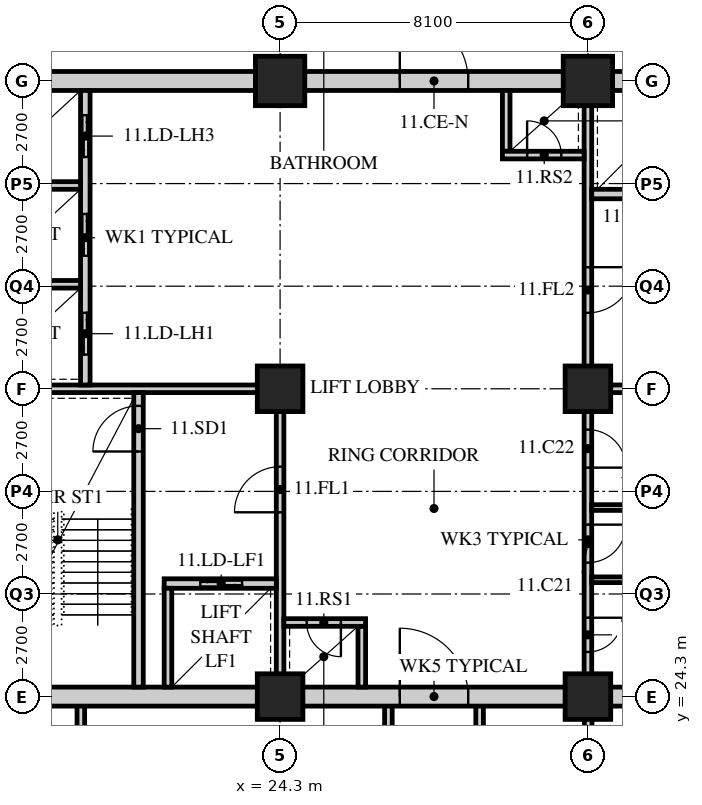
"""IFC4 building model, lengths in metres.
Left out: names, types, materials, properties, quantities, classifications, styles, units other than length and angle.
Written with IfcOpenShell. Run it as: python <this file> out.ifc"""

import sys

from ifc_helpers import new_model, si_unit, direction, frame, frame_2d, origin, origin_2d, place, context, subcontext, project, spatial, rectangle, hollow_rectangle, extrude, element, fill, save


model = new_model("IFC4")
c1 = context("Model", 3, precision=1e-05, world=origin(), true_north=direction((0.0, 1.0)))
c2 = subcontext(c1, "Body", "Model", "MODEL_VIEW")
j1 = project(units=[si_unit("LENGTHUNIT", "METRE"), si_unit("PLANEANGLEUNIT", "RADIAN")], contexts=[c1])
p1 = place(None, origin())
s1 = spatial("IfcSite", under=j1, at=p1, CompositionType="ELEMENT")
p2 = place(p1, origin())
s2 = spatial("IfcBuilding", under=s1, at=p2, CompositionType="ELEMENT")
p3 = place(p2, frame((0.0, 0.0, 50.0)))
s3 = spatial("IfcBuildingStorey", under=s2, at=p3, CompositionType="ELEMENT", Elevation=50.0)
for number, where, z_axis, x_axis in (
    (1, (24.3, 24.3, 0.0), (0.0, 0.0, 1.0), (1.0, 0.0, 0.0)),
    (2, (24.3, 32.4, 0.0), (0.0, 0.0, 1.0), (1.0, 0.0, 0.0)),
):
    element("IfcColumn", number, at=place(p3, frame(where, z_axis=z_axis, x_axis=x_axis)), inside=s3, PredefinedType="COLUMN", context=c2, shape_type="SweptSolid", body=[
        extrude(hollow_rectangle(XDim=1.2, YDim=1.2, WallThickness=0.12, at=origin_2d()), origin(), (0.0, 0.0, 1.0), 3.4),
    ])
p4 = place(p3, frame((24.3, 40.5, 0.0), z_axis=(0.0, 0.0, 1.0), x_axis=(1.0, 0.0, 0.0)))
e3 = element("IfcColumn", 3, at=p4, inside=s3, PredefinedType="COLUMN", context=c2, shape_type="SweptSolid", body=[
    extrude(hollow_rectangle(XDim=1.3, YDim=1.3, WallThickness=0.13, at=origin_2d()), origin(), (0.0, 0.0, 1.0), 3.4),
])
for number, where, z_axis, x_axis in (
    (4, (32.4, 24.3, 0.0), (0.0, 0.0, 1.0), (1.0, 0.0, 0.0)),
    (5, (32.4, 32.4, 0.0), (0.0, 0.0, 1.0), (1.0, 0.0, 0.0)),
):
    element("IfcColumn", number, at=place(p3, frame(where, z_axis=z_axis, x_axis=x_axis)), inside=s3, PredefinedType="COLUMN", context=c2, shape_type="SweptSolid", body=[
        extrude(hollow_rectangle(XDim=1.2, YDim=1.2, WallThickness=0.12, at=origin_2d()), origin(), (0.0, 0.0, 1.0), 3.4),
    ])
p5 = place(p3, frame((32.4, 40.5, 0.0), z_axis=(0.0, 0.0, 1.0), x_axis=(1.0, 0.0, 0.0)))
e6 = element("IfcColumn", 6, at=p5, inside=s3, PredefinedType="COLUMN", context=c2, shape_type="SweptSolid", body=[
    extrude(hollow_rectangle(XDim=1.3, YDim=1.3, WallThickness=0.13, at=origin_2d()), origin(), (0.0, 0.0, 1.0), 3.4),
])
p6 = place(p3, frame((19.057, 18.0, 0.0), z_axis=(0.0, 0.0, 1.0), x_axis=(0.0, 1.0, 0.0)))
e7 = element("IfcWall", 7, at=p6, inside=s3, PredefinedType="SOLIDWALL", context=c2, shape_type="SweptSolid", body=[
    extrude(rectangle(XDim=6.3, YDim=0.2, at=frame_2d((3.15, 0.0))), origin(), (0.0, 0.0, 1.0), 3.19),
])
p7 = place(p3, frame((32.407, 18.0, 0.0), z_axis=(0.0, 0.0, 1.0), x_axis=(0.0, 1.0, 0.0)))
e8 = element("IfcWall", 8, at=p7, inside=s3, PredefinedType="SOLIDWALL", context=c2, shape_type="SweptSolid", body=[
    extrude(rectangle(XDim=6.3, YDim=0.2, at=frame_2d((3.15, 0.0))), origin(), (0.0, 0.0, 1.0), 2.578),
])
for number, where, z_axis, x_axis in (
    (9, (27.15, 18.0, 0.0), (0.0, 0.0, 1.0), (0.0, 1.0, 0.0)),
    (10, (29.55, 18.0, 0.0), (0.0, 0.0, 1.0), (0.0, 1.0, 0.0)),
):
    element("IfcWall", number, at=place(p3, frame(where, z_axis=z_axis, x_axis=x_axis)), inside=s3, PredefinedType="SOLIDWALL", context=c2, shape_type="SweptSolid", body=[
        extrude(rectangle(XDim=6.3, YDim=0.2, at=frame_2d((3.15, 0.0))), origin(), (0.0, 0.0, 1.0), 3.19),
    ])
p8 = place(p3, frame((15.95, 24.3, 0.0), z_axis=(0.0, 0.0, 1.0), x_axis=(1.0, 0.0, 0.0)))
e11 = element("IfcWall", 11, at=p8, inside=s3, PredefinedType="SOLIDWALL", context=c2, shape_type="SweptSolid", body=[
    extrude(rectangle(XDim=24.8, YDim=0.5, at=frame_2d((12.4, 0.0))), origin(), (0.0, 0.0, 1.0), 2.54),
])
p9 = place(p8, frame((11.5, 0.0, 0.0)))
e12 = element("IfcOpeningElement", 12, at=p9, cuts=e11, PredefinedType="OPENING", context=c2, shape_type="SweptSolid", body=[
    extrude(rectangle(XDim=1.8, YDim=2.4, at=frame_2d((0.9, 1.2))), frame((0.0, 0.26, 0.0), z_axis=(0.0, -1.0, 0.0), x_axis=(1.0, 0.0, 0.0)), (0.0, 0.0, 1.0), 0.52),
])
p10 = place(p3, frame((15.95, 40.5, 0.0), z_axis=(0.0, 0.0, 1.0), x_axis=(1.0, 0.0, 0.0)))
e13 = element("IfcWall", 13, at=p10, inside=s3, PredefinedType="SOLIDWALL", context=c2, shape_type="SweptSolid", body=[
    extrude(rectangle(XDim=24.8, YDim=0.5, at=frame_2d((12.4, 0.0))), origin(), (0.0, 0.0, 1.0), 2.54),
])
p11 = place(p10, frame((11.5, 0.0, 0.0)))
e14 = element("IfcOpeningElement", 14, at=p11, cuts=e13, PredefinedType="OPENING", context=c2, shape_type="SweptSolid", body=[
    extrude(rectangle(XDim=1.8, YDim=2.4, at=frame_2d((0.9, 1.2))), frame((0.0, 0.26, 0.0), z_axis=(0.0, -1.0, 0.0), x_axis=(1.0, 0.0, 0.0)), (0.0, 0.0, 1.0), 0.52),
])
p12 = place(p3, frame((16.45, 32.4, 0.0), z_axis=(0.0, 0.0, 1.0), x_axis=(1.0, 0.0, 0.0)))
e15 = element("IfcWall", 15, at=p12, inside=s3, PredefinedType="SOLIDWALL", context=c2, shape_type="SweptSolid", body=[
    extrude(rectangle(XDim=7.95, YDim=0.2, at=frame_2d((3.975, 0.0))), origin(), (0.0, 0.0, 1.0), 2.578),
])
p13 = place(p3, frame((24.3, 24.55, 0.0), z_axis=(0.0, 0.0, 1.0), x_axis=(0.0, 1.0, 0.0)))
e16 = element("IfcWall", 16, at=p13, inside=s3, PredefinedType="SOLIDWALL", context=c2, shape_type="SweptSolid", body=[
    extrude(rectangle(XDim=7.75, YDim=0.2, at=frame_2d((3.875, 0.0))), origin(), (0.0, 0.0, 1.0), 2.578),
])
p14 = place(p13, frame((4.6, 0.0, 0.0)))
e17 = element("IfcOpeningElement", 17, at=p14, cuts=e16, PredefinedType="OPENING", context=c2, shape_type="SweptSolid", body=[
    extrude(rectangle(XDim=1.2, YDim=2.1, at=frame_2d((0.6, 1.05))), frame((0.0, 0.11, 0.0), z_axis=(0.0, -1.0, 0.0), x_axis=(1.0, 0.0, 0.0)), (0.0, 0.0, 1.0), 0.22),
])
p15 = place(p3, frame((20.575, 24.55, 0.0), z_axis=(0.0, 0.0, 1.0), x_axis=(0.0, 1.0, 0.0)))
e18 = element("IfcWall", 18, at=p15, inside=s3, PredefinedType="SOLIDWALL", context=c2, shape_type="SweptSolid", body=[
    extrude(rectangle(XDim=7.75, YDim=0.25, at=frame_2d((3.875, 0.0))), origin(), (0.0, 0.0, 1.0), 3.19),
])
p16 = place(p15, frame((6.2, 0.0, 0.0)))
e19 = element("IfcOpeningElement", 19, at=p16, cuts=e18, PredefinedType="OPENING", context=c2, shape_type="SweptSolid", body=[
    extrude(rectangle(XDim=1.2, YDim=2.1, at=frame_2d((0.6, 1.05))), frame((0.0, 0.135, 0.0), z_axis=(0.0, -1.0, 0.0), x_axis=(1.0, 0.0, 0.0)), (0.0, 0.0, 1.0), 0.27),
])
p17 = place(p3, frame((21.25, 27.275, 0.0), z_axis=(0.0, 0.0, 1.0), x_axis=(1.0, 0.0, 0.0)))
e20 = element("IfcWall", 20, at=p17, inside=s3, PredefinedType="SOLIDWALL", context=c2, shape_type="SweptSolid", body=[
    extrude(rectangle(XDim=2.95, YDim=0.25, at=frame_2d((1.475, 0.0))), origin(), (0.0, 0.0, 1.0), 3.19),
])
p18 = place(p17, frame((0.95, 0.0, 0.0)))
e21 = element("IfcOpeningElement", 21, at=p18, cuts=e20, PredefinedType="OPENING", context=c2, shape_type="SweptSolid", body=[
    extrude(rectangle(XDim=1.1, YDim=2.4, at=frame_2d((0.55, 1.2))), frame((0.0, 0.135, 0.0), z_axis=(0.0, -1.0, 0.0), x_axis=(1.0, 0.0, 0.0)), (0.0, 0.0, 1.0), 0.27),
])
p19 = place(p3, frame((21.35, 24.55, 0.0), z_axis=(0.0, 0.0, 1.0), x_axis=(0.0, 1.0, 0.0)))
e22 = element("IfcWall", 22, at=p19, inside=s3, PredefinedType="SOLIDWALL", context=c2, shape_type="SweptSolid", body=[
    extrude(rectangle(XDim=2.6, YDim=0.2, at=frame_2d((1.3, 0.0))), origin(), (0.0, 0.0, 1.0), 3.19),
])
p20 = place(p3, frame((19.175, 32.5, 0.0), z_axis=(0.0, 0.0, 1.0), x_axis=(0.0, 1.0, 0.0)))
e23 = element("IfcWall", 23, at=p20, inside=s3, PredefinedType="SOLIDWALL", context=c2, shape_type="SweptSolid", body=[
    extrude(rectangle(XDim=7.75, YDim=0.25, at=frame_2d((3.875, 0.0))), origin(), (0.0, 0.0, 1.0), 3.19),
])
p21 = place(p20, frame((0.8, 0.0, 0.0)))
e24 = element("IfcOpeningElement", 24, at=p21, cuts=e23, PredefinedType="OPENING", context=c2, shape_type="SweptSolid", body=[
    extrude(rectangle(XDim=1.1, YDim=2.4, at=frame_2d((0.55, 1.2))), frame((0.0, 0.135, 0.0), z_axis=(0.0, -1.0, 0.0), x_axis=(1.0, 0.0, 0.0)), (0.0, 0.0, 1.0), 0.27),
])
p22 = place(p20, frame((3.4, 0.0, 0.0)))
e25 = element("IfcOpeningElement", 25, at=p22, cuts=e23, PredefinedType="OPENING", context=c2, shape_type="SweptSolid", body=[
    extrude(rectangle(XDim=1.1, YDim=2.4, at=frame_2d((0.55, 1.2))), frame((0.0, 0.135, 0.0), z_axis=(0.0, -1.0, 0.0), x_axis=(1.0, 0.0, 0.0)), (0.0, 0.0, 1.0), 0.27),
])
p23 = place(p20, frame((6.0, 0.0, 0.0)))
e26 = element("IfcOpeningElement", 26, at=p23, cuts=e23, PredefinedType="OPENING", context=c2, shape_type="SweptSolid", body=[
    extrude(rectangle(XDim=1.1, YDim=2.4, at=frame_2d((0.55, 1.2))), frame((0.0, 0.135, 0.0), z_axis=(0.0, -1.0, 0.0), x_axis=(1.0, 0.0, 0.0)), (0.0, 0.0, 1.0), 0.27),
])
for number, where, z_axis, x_axis in (
    (27, (16.45, 35.15, 0.0), (0.0, 0.0, 1.0), (1.0, 0.0, 0.0)),
    (28, (16.45, 37.75, 0.0), (0.0, 0.0, 1.0), (1.0, 0.0, 0.0)),
):
    element("IfcWall", number, at=place(p3, frame(where, z_axis=z_axis, x_axis=x_axis)), inside=s3, PredefinedType="SOLIDWALL", context=c2, shape_type="SweptSolid", body=[
        extrude(rectangle(XDim=2.6, YDim=0.2, at=frame_2d((1.3, 0.0))), origin(), (0.0, 0.0, 1.0), 3.19),
    ])
p24 = place(p3, frame((26.45, 24.55, 0.0), z_axis=(0.0, 0.0, 1.0), x_axis=(0.0, 1.0, 0.0)))
e29 = element("IfcWall", 29, at=p24, inside=s3, PredefinedType="SOLIDWALL", context=c2, shape_type="SweptSolid", body=[
    extrude(rectangle(XDim=1.6, YDim=0.2, at=frame_2d((0.8, 0.0))), origin(), (0.0, 0.0, 1.0), 3.19),
])
p25 = place(p3, frame((24.4, 26.25, 0.0), z_axis=(0.0, 0.0, 1.0), x_axis=(1.0, 0.0, 0.0)))
e30 = element("IfcWall", 30, at=p25, inside=s3, PredefinedType="SOLIDWALL", context=c2, shape_type="SweptSolid", body=[
    extrude(rectangle(XDim=2.15, YDim=0.2, at=frame_2d((1.075, 0.0))), origin(), (0.0, 0.0, 1.0), 3.19),
])
p26 = place(p25, frame((0.6, 0.0, 0.0)))
e31 = element("IfcOpeningElement", 31, at=p26, cuts=e30, PredefinedType="OPENING", context=c2, shape_type="SweptSolid", body=[
    extrude(rectangle(XDim=0.9, YDim=2.1, at=frame_2d((0.45, 1.05))), frame((0.0, 0.11, 0.0), z_axis=(0.0, -1.0, 0.0), x_axis=(1.0, 0.0, 0.0)), (0.0, 0.0, 1.0), 0.22),
])
p27 = place(p3, frame((32.3, 32.4, 0.0), z_axis=(0.0, 0.0, 1.0), x_axis=(1.0, 0.0, 0.0)))
e32 = element("IfcWall", 32, at=p27, inside=s3, PredefinedType="SOLIDWALL", context=c2, shape_type="SweptSolid", body=[
    extrude(rectangle(XDim=7.95, YDim=0.2, at=frame_2d((3.975, 0.0))), origin(), (0.0, 0.0, 1.0), 2.578),
])
p28 = place(p3, frame((32.4, 32.5, 0.0), z_axis=(0.0, 0.0, 1.0), x_axis=(0.0, 1.0, 0.0)))
e33 = element("IfcWall", 33, at=p28, inside=s3, PredefinedType="SOLIDWALL", context=c2, shape_type="SweptSolid", body=[
    extrude(rectangle(XDim=7.75, YDim=0.2, at=frame_2d((3.875, 0.0))), origin(), (0.0, 0.0, 1.0), 2.578),
])
p29 = place(p28, frame((1.9, 0.0, 0.0)))
e34 = element("IfcOpeningElement", 34, at=p29, cuts=e33, PredefinedType="OPENING", context=c2, shape_type="SweptSolid", body=[
    extrude(rectangle(XDim=1.2, YDim=2.1, at=frame_2d((0.6, 1.05))), frame((0.0, 0.11, 0.0), z_axis=(0.0, -1.0, 0.0), x_axis=(1.0, 0.0, 0.0)), (0.0, 0.0, 1.0), 0.22),
])
p30 = place(p3, frame((32.5, 37.525, 0.0), z_axis=(0.0, 0.0, 1.0), x_axis=(1.0, 0.0, 0.0)))
e35 = element("IfcWall", 35, at=p30, inside=s3, PredefinedType="SOLIDWALL", context=c2, shape_type="SweptSolid", body=[
    extrude(rectangle(XDim=2.95, YDim=0.25, at=frame_2d((1.475, 0.0))), origin(), (0.0, 0.0, 1.0), 3.19),
])
p31 = place(p30, frame((0.9, 0.0, 0.0)))
e36 = element("IfcOpeningElement", 36, at=p31, cuts=e35, PredefinedType="OPENING", context=c2, shape_type="SweptSolid", body=[
    extrude(rectangle(XDim=1.1, YDim=2.4, at=frame_2d((0.55, 1.2))), frame((0.0, 0.135, 0.0), z_axis=(0.0, -1.0, 0.0), x_axis=(1.0, 0.0, 0.0)), (0.0, 0.0, 1.0), 0.27),
])
p32 = place(p3, frame((30.25, 38.65, 0.0), z_axis=(0.0, 0.0, 1.0), x_axis=(0.0, 1.0, 0.0)))
e37 = element("IfcWall", 37, at=p32, inside=s3, PredefinedType="SOLIDWALL", context=c2, shape_type="SweptSolid", body=[
    extrude(rectangle(XDim=1.6, YDim=0.2, at=frame_2d((0.8, 0.0))), origin(), (0.0, 0.0, 1.0), 3.19),
])
p33 = place(p3, frame((30.15, 38.55, 0.0), z_axis=(0.0, 0.0, 1.0), x_axis=(1.0, 0.0, 0.0)))
e38 = element("IfcWall", 38, at=p33, inside=s3, PredefinedType="SOLIDWALL", context=c2, shape_type="SweptSolid", body=[
    extrude(rectangle(XDim=2.15, YDim=0.2, at=frame_2d((1.075, 0.0))), origin(), (0.0, 0.0, 1.0), 3.19),
])
p34 = place(p33, frame((0.65, 0.0, 0.0)))
e39 = element("IfcOpeningElement", 39, at=p34, cuts=e38, PredefinedType="OPENING", context=c2, shape_type="SweptSolid", body=[
    extrude(rectangle(XDim=0.9, YDim=2.1, at=frame_2d((0.45, 1.05))), frame((0.0, 0.11, 0.0), z_axis=(0.0, -1.0, 0.0), x_axis=(1.0, 0.0, 0.0)), (0.0, 0.0, 1.0), 0.22),
])
p35 = place(p3, frame((32.4, 24.55, 0.0), z_axis=(0.0, 0.0, 1.0), x_axis=(0.0, 1.0, 0.0)))
e40 = element("IfcWall", 40, at=p35, inside=s3, PredefinedType="PARTITIONING", context=c2, shape_type="SweptSolid", body=[
    extrude(rectangle(XDim=7.75, YDim=0.2, at=frame_2d((3.875, 0.0))), origin(), (0.0, 0.0, 1.0), 2.578),
])
p36 = place(p35, frame((0.925, 0.0, 0.0)))
e41 = element("IfcOpeningElement", 41, at=p36, cuts=e40, PredefinedType="OPENING", context=c2, shape_type="SweptSolid", body=[
    extrude(rectangle(XDim=0.9, YDim=2.1, at=frame_2d((0.45, 1.05))), frame((0.0, 0.11, 0.0), z_axis=(0.0, -1.0, 0.0), x_axis=(1.0, 0.0, 0.0)), (0.0, 0.0, 1.0), 0.22),
])
p37 = place(p35, frame((3.275, 0.0, 0.0)))
e42 = element("IfcOpeningElement", 42, at=p37, cuts=e40, PredefinedType="OPENING", context=c2, shape_type="SweptSolid", body=[
    extrude(rectangle(XDim=1.0, YDim=2.1, at=frame_2d((0.5, 1.05))), frame((0.0, 0.11, 0.0), z_axis=(0.0, -1.0, 0.0), x_axis=(1.0, 0.0, 0.0)), (0.0, 0.0, 1.0), 0.22),
])
p38 = place(p35, frame((5.775, 0.0, 0.0)))
e43 = element("IfcOpeningElement", 43, at=p38, cuts=e40, PredefinedType="OPENING", context=c2, shape_type="SweptSolid", body=[
    extrude(rectangle(XDim=1.0, YDim=2.1, at=frame_2d((0.5, 1.05))), frame((0.0, 0.11, 0.0), z_axis=(0.0, -1.0, 0.0), x_axis=(1.0, 0.0, 0.0)), (0.0, 0.0, 1.0), 0.22),
])
p39 = place(p3, frame((32.5, 27.375, 0.0), z_axis=(0.0, 0.0, 1.0), x_axis=(1.0, 0.0, 0.0)))
e44 = element("IfcWall", 44, at=p39, inside=s3, PredefinedType="PARTITIONING", context=c2, shape_type="SweptSolid", body=[
    extrude(rectangle(XDim=2.15, YDim=0.15, at=frame_2d((1.075, 0.0))), origin(), (0.0, 0.0, 1.0), 3.19),
])
p40 = place(p3, frame((32.5, 29.275, 0.0), z_axis=(0.0, 0.0, 1.0), x_axis=(1.0, 0.0, 0.0)))
e45 = element("IfcWall", 45, at=p40, inside=s3, PredefinedType="PARTITIONING", context=c2, shape_type="SweptSolid", body=[
    extrude(rectangle(XDim=4.9, YDim=0.15, at=frame_2d((2.45, 0.0))), origin(), (0.0, 0.0, 1.0), 3.19),
])
p41 = place(p36, origin())
e46 = element("IfcDoor", 46, at=p41, inside=s3, OperationType="SINGLE_SWING_LEFT", PredefinedType="DOOR", context=c2, shape_type="SweptSolid", body=[
    extrude(rectangle(XDim=0.9, YDim=2.1, at=frame_2d((0.45, 1.05))), frame((0.0, 0.025, 0.0), z_axis=(0.0, -1.0, 0.0), x_axis=(1.0, 0.0, 0.0)), (0.0, 0.0, 1.0), 0.05),
])
fill(e41, e46)
p42 = place(p37, origin())
e47 = element("IfcDoor", 47, at=p42, inside=s3, OperationType="SINGLE_SWING_LEFT", PredefinedType="DOOR", context=c2, shape_type="SweptSolid", body=[
    extrude(rectangle(XDim=1.0, YDim=2.1, at=frame_2d((0.5, 1.05))), frame((0.0, 0.025, 0.0), z_axis=(0.0, -1.0, 0.0), x_axis=(1.0, 0.0, 0.0)), (0.0, 0.0, 1.0), 0.05),
])
fill(e42, e47)
p43 = place(p38, origin())
e48 = element("IfcDoor", 48, at=p43, inside=s3, OperationType="SINGLE_SWING_RIGHT", PredefinedType="DOOR", context=c2, shape_type="SweptSolid", body=[
    extrude(rectangle(XDim=1.0, YDim=2.1, at=frame_2d((0.5, 1.05))), frame((0.0, 0.025, 0.0), z_axis=(0.0, -1.0, 0.0), x_axis=(1.0, 0.0, 0.0)), (0.0, 0.0, 1.0), 0.05),
])
fill(e43, e48)
p44 = place(p16, origin())
e49 = element("IfcDoor", 49, at=p44, inside=s3, OperationType="SINGLE_SWING_LEFT", PredefinedType="DOOR", context=c2, shape_type="SweptSolid", body=[
    extrude(rectangle(XDim=1.2, YDim=2.1, at=frame_2d((0.6, 1.05))), frame((0.0, 0.025, 0.0), z_axis=(0.0, -1.0, 0.0), x_axis=(1.0, 0.0, 0.0)), (0.0, 0.0, 1.0), 0.05),
])
fill(e19, e49)
p45 = place(p14, origin())
e50 = element("IfcDoor", 50, at=p45, inside=s3, OperationType="SINGLE_SWING_LEFT", PredefinedType="DOOR", context=c2, shape_type="SweptSolid", body=[
    extrude(rectangle(XDim=1.2, YDim=2.1, at=frame_2d((0.6, 1.05))), frame((0.0, 0.025, 0.0), z_axis=(0.0, -1.0, 0.0), x_axis=(1.0, 0.0, 0.0)), (0.0, 0.0, 1.0), 0.05),
])
fill(e17, e50)
p46 = place(p26, origin())
e51 = element("IfcDoor", 51, at=p46, inside=s3, OperationType="SINGLE_SWING_LEFT", PredefinedType="DOOR", context=c2, shape_type="SweptSolid", body=[
    extrude(rectangle(XDim=0.9, YDim=2.1, at=frame_2d((0.45, 1.05))), frame((0.0, 0.025, 0.0), z_axis=(0.0, -1.0, 0.0), x_axis=(1.0, 0.0, 0.0)), (0.0, 0.0, 1.0), 0.05),
])
fill(e31, e51)
p47 = place(p29, origin())
e52 = element("IfcDoor", 52, at=p47, inside=s3, OperationType="SINGLE_SWING_LEFT", PredefinedType="DOOR", context=c2, shape_type="SweptSolid", body=[
    extrude(rectangle(XDim=1.2, YDim=2.1, at=frame_2d((0.6, 1.05))), frame((0.0, 0.025, 0.0), z_axis=(0.0, -1.0, 0.0), x_axis=(1.0, 0.0, 0.0)), (0.0, 0.0, 1.0), 0.05),
])
fill(e34, e52)
p48 = place(p34, origin())
e53 = element("IfcDoor", 53, at=p48, inside=s3, OperationType="SINGLE_SWING_LEFT", PredefinedType="DOOR", context=c2, shape_type="SweptSolid", body=[
    extrude(rectangle(XDim=0.9, YDim=2.1, at=frame_2d((0.45, 1.05))), frame((0.0, 0.025, 0.0), z_axis=(0.0, -1.0, 0.0), x_axis=(1.0, 0.0, 0.0)), (0.0, 0.0, 1.0), 0.05),
])
fill(e39, e53)
p49 = place(p21, origin())
e54 = element("IfcDoor", 54, at=p49, inside=s3, OperationType="DOUBLE_DOOR_SLIDING", PredefinedType="DOOR", context=c2, shape_type="SweptSolid", body=[
    extrude(rectangle(XDim=1.1, YDim=2.4, at=frame_2d((0.55, 1.2))), frame((0.0, 0.025, 0.0), z_axis=(0.0, -1.0, 0.0), x_axis=(1.0, 0.0, 0.0)), (0.0, 0.0, 1.0), 0.05),
])
fill(e24, e54)
p50 = place(p22, origin())
e55 = element("IfcDoor", 55, at=p50, inside=s3, OperationType="DOUBLE_DOOR_SLIDING", PredefinedType="DOOR", context=c2, shape_type="SweptSolid", body=[
    extrude(rectangle(XDim=1.1, YDim=2.4, at=frame_2d((0.55, 1.2))), frame((0.0, 0.025, 0.0), z_axis=(0.0, -1.0, 0.0), x_axis=(1.0, 0.0, 0.0)), (0.0, 0.0, 1.0), 0.05),
])
fill(e25, e55)
p51 = place(p23, origin())
e56 = element("IfcDoor", 56, at=p51, inside=s3, OperationType="DOUBLE_DOOR_SLIDING", PredefinedType="DOOR", context=c2, shape_type="SweptSolid", body=[
    extrude(rectangle(XDim=1.1, YDim=2.4, at=frame_2d((0.55, 1.2))), frame((0.0, 0.025, 0.0), z_axis=(0.0, -1.0, 0.0), x_axis=(1.0, 0.0, 0.0)), (0.0, 0.0, 1.0), 0.05),
])
fill(e26, e56)
p52 = place(p18, origin())
e57 = element("IfcDoor", 57, at=p52, inside=s3, OperationType="DOUBLE_DOOR_SLIDING", PredefinedType="DOOR", context=c2, shape_type="SweptSolid", body=[
    extrude(rectangle(XDim=1.1, YDim=2.4, at=frame_2d((0.55, 1.2))), frame((0.0, 0.025, 0.0), z_axis=(0.0, -1.0, 0.0), x_axis=(1.0, 0.0, 0.0)), (0.0, 0.0, 1.0), 0.05),
])
fill(e21, e57)
p53 = place(p9, origin())
e58 = element("IfcDoor", 58, at=p53, inside=s3, OperationType="DOUBLE_DOOR_SINGLE_SWING", PredefinedType="DOOR", context=c2, shape_type="SweptSolid", body=[
    extrude(rectangle(XDim=1.8, YDim=2.4, at=frame_2d((0.9, 1.2))), frame((0.0, 0.025, 0.0), z_axis=(0.0, -1.0, 0.0), x_axis=(1.0, 0.0, 0.0)), (0.0, 0.0, 1.0), 0.05),
])
fill(e12, e58)
p54 = place(p11, origin())
e59 = element("IfcDoor", 59, at=p54, inside=s3, OperationType="DOUBLE_DOOR_SINGLE_SWING", PredefinedType="DOOR", context=c2, shape_type="SweptSolid", body=[
    extrude(rectangle(XDim=1.8, YDim=2.4, at=frame_2d((0.9, 1.2))), frame((0.0, 0.025, 0.0), z_axis=(0.0, -1.0, 0.0), x_axis=(1.0, 0.0, 0.0)), (0.0, 0.0, 1.0), 0.05),
])
fill(e14, e59)
save(model, sys.argv[1])
